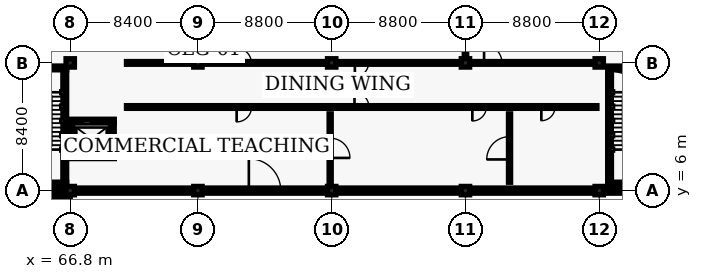
"""IFC4 building model, lengths in metres.
Left out: names, types, materials, properties, quantities, classifications, styles, units other than length and angle.
Written with IfcOpenShell. Run it as: python <this file> out.ifc"""

import sys

from ifc_helpers import new_model, si_unit, direction, frame, frame_2d, origin, origin_2d, place, context, subcontext, project, spatial, rectangle, extrude, element, fill, save


model = new_model("IFC4")
c1 = context("Model", 3, precision=1e-05, world=origin(), true_north=direction((0.0, 1.0)))
c2 = subcontext(c1, "Body", "Model", "MODEL_VIEW")
j1 = project(units=[si_unit("LENGTHUNIT", "METRE"), si_unit("PLANEANGLEUNIT", "RADIAN")], contexts=[c1])
p1 = place(None, origin())
s1 = spatial("IfcSite", under=j1, at=p1, CompositionType="ELEMENT")
p2 = place(p1, origin())
s2 = spatial("IfcBuilding", under=s1, at=p2, CompositionType="ELEMENT")
p3 = place(p2, origin())
s3 = spatial("IfcBuildingStorey", under=s2, at=p3, CompositionType="ELEMENT", Elevation=0.0)
for number, where, z_axis, x_axis in (
    (1, (66.8, 6.0, 0.0), (0.0, 0.0, 1.0), (1.0, 0.0, 0.0)),
    (2, (66.8, 14.4, 0.0), (0.0, 0.0, 1.0), (1.0, 0.0, 0.0)),
    (3, (75.2, 6.0, 0.0), (0.0, 0.0, 1.0), (1.0, 0.0, 0.0)),
    (4, (75.2, 14.4, 0.0), (0.0, 0.0, 1.0), (1.0, 0.0, 0.0)),
    (5, (84.0, 6.0, 0.0), (0.0, 0.0, 1.0), (1.0, 0.0, 0.0)),
    (6, (84.0, 14.4, 0.0), (0.0, 0.0, 1.0), (1.0, 0.0, 0.0)),
    (7, (92.8, 6.0, 0.0), (0.0, 0.0, 1.0), (1.0, 0.0, 0.0)),
    (8, (92.8, 14.4, 0.0), (0.0, 0.0, 1.0), (1.0, 0.0, 0.0)),
    (9, (101.6, 6.0, 0.0), (0.0, 0.0, 1.0), (1.0, 0.0, 0.0)),
    (10, (101.6, 14.4, 0.0), (0.0, 0.0, 1.0), (1.0, 0.0, 0.0)),
):
    element("IfcColumn", number, at=place(p3, frame(where, z_axis=z_axis, x_axis=x_axis)), inside=s3, PredefinedType="COLUMN", context=c2, shape_type="SweptSolid", body=[
        extrude(rectangle(XDim=0.55, YDim=0.55, at=origin_2d()), origin(), (0.0, 0.0, 1.0), 4.8),
    ])
p4 = place(p3, frame((58.5, 6.0, 0.0), z_axis=(0.0, 0.0, 1.0), x_axis=(1.0, 0.0, 0.0)))
e11 = element("IfcWall", 11, at=p4, inside=s3, PredefinedType="SOLIDWALL", context=c2, shape_type="SweptSolid", body=[
    extrude(rectangle(XDim=8.2, YDim=0.34, at=frame_2d((4.1, 0.0))), origin(), (0.0, 0.0, 1.0), 4.065),
])
p5 = place(p3, frame((66.9, 6.0, 0.0), z_axis=(0.0, 0.0, 1.0), x_axis=(1.0, 0.0, 0.0)))
e12 = element("IfcWall", 12, at=p5, inside=s3, PredefinedType="SOLIDWALL", context=c2, shape_type="SweptSolid", body=[
    extrude(rectangle(XDim=8.2, YDim=0.34, at=frame_2d((4.1, 0.0))), origin(), (0.0, 0.0, 1.0), 4.065),
])
p6 = place(p3, frame((75.3, 6.0, 0.0), z_axis=(0.0, 0.0, 1.0), x_axis=(1.0, 0.0, 0.0)))
e13 = element("IfcWall", 13, at=p6, inside=s3, PredefinedType="SOLIDWALL", context=c2, shape_type="SweptSolid", body=[
    extrude(rectangle(XDim=8.6, YDim=0.34, at=frame_2d((4.3, 0.0))), origin(), (0.0, 0.0, 1.0), 4.065),
])
p7 = place(p6, frame((3.25, 0.0, 0.0)))
e14 = element("IfcOpeningElement", 14, at=p7, cuts=e13, PredefinedType="OPENING", context=c2, shape_type="SweptSolid", body=[
    extrude(rectangle(XDim=2.1, YDim=2.35, at=frame_2d((1.05, 1.175))), frame((0.0, 0.18, 0.0), z_axis=(0.0, -1.0, 0.0), x_axis=(1.0, 0.0, 0.0)), (0.0, 0.0, 1.0), 0.36),
])
p8 = place(p3, frame((84.1, 6.0, 0.0), z_axis=(0.0, 0.0, 1.0), x_axis=(1.0, 0.0, 0.0)))
e15 = element("IfcWall", 15, at=p8, inside=s3, PredefinedType="SOLIDWALL", context=c2, shape_type="SweptSolid", body=[
    extrude(rectangle(XDim=8.6, YDim=0.34, at=frame_2d((4.3, 0.0))), origin(), (0.0, 0.0, 1.0), 4.065),
])
p9 = place(p8, frame((2.117, 0.0, 1.1)))
e16 = element("IfcOpeningElement", 16, at=p9, cuts=e15, PredefinedType="OPENING", context=c2, shape_type="SweptSolid", body=[
    extrude(rectangle(XDim=1.5, YDim=1.8, at=frame_2d((0.75, 0.9))), frame((0.0, 0.18, 0.0), z_axis=(0.0, -1.0, 0.0), x_axis=(1.0, 0.0, 0.0)), (0.0, 0.0, 1.0), 0.36),
])
p10 = place(p8, frame((4.983, 0.0, 1.1)))
e17 = element("IfcOpeningElement", 17, at=p10, cuts=e15, PredefinedType="OPENING", context=c2, shape_type="SweptSolid", body=[
    extrude(rectangle(XDim=1.5, YDim=1.8, at=frame_2d((0.75, 0.9))), frame((0.0, 0.18, 0.0), z_axis=(0.0, -1.0, 0.0), x_axis=(1.0, 0.0, 0.0)), (0.0, 0.0, 1.0), 0.36),
])
p11 = place(p3, frame((92.9, 6.0, 0.0), z_axis=(0.0, 0.0, 1.0), x_axis=(1.0, 0.0, 0.0)))
e18 = element("IfcWall", 18, at=p11, inside=s3, PredefinedType="SOLIDWALL", context=c2, shape_type="SweptSolid", body=[
    extrude(rectangle(XDim=8.6, YDim=0.34, at=frame_2d((4.3, 0.0))), origin(), (0.0, 0.0, 1.0), 4.065),
])
p12 = place(p11, frame((1.967, 0.0, 1.1)))
e19 = element("IfcOpeningElement", 19, at=p12, cuts=e18, PredefinedType="OPENING", context=c2, shape_type="SweptSolid", body=[
    extrude(rectangle(XDim=1.8, YDim=1.8, at=frame_2d((0.9, 0.9))), frame((0.0, 0.18, 0.0), z_axis=(0.0, -1.0, 0.0), x_axis=(1.0, 0.0, 0.0)), (0.0, 0.0, 1.0), 0.36),
])
p13 = place(p11, frame((4.833, 0.0, 1.1)))
e20 = element("IfcOpeningElement", 20, at=p13, cuts=e18, PredefinedType="OPENING", context=c2, shape_type="SweptSolid", body=[
    extrude(rectangle(XDim=1.8, YDim=1.8, at=frame_2d((0.9, 0.9))), frame((0.0, 0.18, 0.0), z_axis=(0.0, -1.0, 0.0), x_axis=(1.0, 0.0, 0.0)), (0.0, 0.0, 1.0), 0.36),
])
p14 = place(p3, frame((101.7, 6.0, 0.0), z_axis=(0.0, 0.0, 1.0), x_axis=(1.0, 0.0, 0.0)))
e21 = element("IfcWall", 21, at=p14, inside=s3, PredefinedType="SOLIDWALL", context=c2, shape_type="SweptSolid", body=[
    extrude(rectangle(XDim=8.6, YDim=0.34, at=frame_2d((4.3, 0.0))), origin(), (0.0, 0.0, 1.0), 4.065),
])
p15 = place(p3, frame((58.4, 5.45, 0.0), z_axis=(0.0, 0.0, 1.0), x_axis=(1.0, 0.0, 0.0)))
e22 = element("IfcWall", 22, at=p15, inside=s3, PredefinedType="PARAPET", context=c2, shape_type="SweptSolid", body=[
    extrude(rectangle(XDim=8.4, YDim=0.2, at=frame_2d((4.2, 0.0))), origin(), (0.0, 0.0, 1.0), 1.2),
])
p16 = place(p3, frame((62.955, 14.07, 0.0), z_axis=(0.0, 0.0, 1.0), x_axis=(1.0, 0.0, 0.0)))
e23 = element("IfcWall", 23, at=p16, inside=s3, PredefinedType="SHEAR", context=c2, shape_type="SweptSolid", body=[
    extrude(rectangle(XDim=3.61, YDim=0.25, at=frame_2d((1.805, 0.0))), origin(), (0.0, 0.0, 1.0), 4.56),
])
p17 = place(p16, frame((1.205, 0.0, 0.0)))
e24 = element("IfcOpeningElement", 24, at=p17, cuts=e23, PredefinedType="OPENING", context=c2, shape_type="SweptSolid", body=[
    extrude(rectangle(XDim=1.2, YDim=2.15, at=frame_2d((0.6, 1.075))), frame((0.0, 0.135, 0.0), z_axis=(0.0, -1.0, 0.0), x_axis=(1.0, 0.0, 0.0)), (0.0, 0.0, 1.0), 0.27),
])
p18 = place(p3, frame((66.565, 6.43, 0.0), z_axis=(0.0, 0.0, 1.0), x_axis=(-1.0, 0.0, 0.0)))
e25 = element("IfcWall", 25, at=p18, inside=s3, PredefinedType="SHEAR", context=c2, shape_type="SweptSolid", body=[
    extrude(rectangle(XDim=3.61, YDim=0.25, at=frame_2d((1.805, 0.0))), origin(), (0.0, 0.0, 1.0), 4.56),
])
p19 = place(p3, frame((66.44, 13.945, 0.0), z_axis=(0.0, 0.0, 1.0), x_axis=(0.0, -1.0, 0.0)))
e26 = element("IfcWall", 26, at=p19, inside=s3, PredefinedType="SHEAR", context=c2, shape_type="SweptSolid", body=[
    extrude(rectangle(XDim=7.39, YDim=0.25, at=frame_2d((3.695, 0.0))), origin(), (0.0, 0.0, 1.0), 4.56),
])
p20 = place(p3, frame((66.7, 8.23, 0.0), z_axis=(0.0, 0.0, 1.0), x_axis=(1.0, 0.0, 0.0)))
e27 = element("IfcWall", 27, at=p20, inside=s3, PredefinedType="SHEAR", context=c2, shape_type="SweptSolid", body=[
    extrude(rectangle(XDim=3.0, YDim=0.25, at=frame_2d((1.5, 0.0))), origin(), (0.0, 0.0, 1.0), 4.56),
])
p21 = place(p3, frame((69.7, 10.57, 0.0), z_axis=(0.0, 0.0, 1.0), x_axis=(-1.0, 0.0, 0.0)))
e28 = element("IfcWall", 28, at=p21, inside=s3, PredefinedType="SHEAR", context=c2, shape_type="SweptSolid", body=[
    extrude(rectangle(XDim=3.0, YDim=0.25, at=frame_2d((1.5, 0.0))), origin(), (0.0, 0.0, 1.0), 4.56),
])
p22 = place(p21, frame((0.95, 0.0, 0.0)))
e29 = element("IfcOpeningElement", 29, at=p22, cuts=e28, PredefinedType="OPENING", context=c2, shape_type="SweptSolid", body=[
    extrude(rectangle(XDim=1.1, YDim=2.15, at=frame_2d((0.55, 1.075))), frame((0.0, 0.135, 0.0), z_axis=(0.0, -1.0, 0.0), x_axis=(1.0, 0.0, 0.0)), (0.0, 0.0, 1.0), 0.27),
])
for number, where, z_axis, x_axis in (
    (30, (69.57, 8.36, 0.0), (0.0, 0.0, 1.0), (0.0, 1.0, 0.0)),
    (31, (66.83, 10.44, 0.0), (0.0, 0.0, 1.0), (0.0, -1.0, 0.0)),
):
    element("IfcWall", number, at=place(p3, frame(where, z_axis=z_axis, x_axis=x_axis)), inside=s3, PredefinedType="SHEAR", context=c2, shape_type="SweptSolid", body=[
        extrude(rectangle(XDim=2.08, YDim=0.25, at=frame_2d((1.04, 0.0))), origin(), (0.0, 0.0, 1.0), 4.56),
    ])
p23 = place(p3, frame((102.155, 14.07, 0.0), z_axis=(0.0, 0.0, 1.0), x_axis=(1.0, 0.0, 0.0)))
e32 = element("IfcWall", 32, at=p23, inside=s3, PredefinedType="SHEAR", context=c2, shape_type="SweptSolid", body=[
    extrude(rectangle(XDim=3.61, YDim=0.25, at=frame_2d((1.805, 0.0))), origin(), (0.0, 0.0, 1.0), 4.56),
])
p24 = place(p23, frame((1.235, 0.0, 0.0)))
e33 = element("IfcOpeningElement", 33, at=p24, cuts=e32, PredefinedType="OPENING", context=c2, shape_type="SweptSolid", body=[
    extrude(rectangle(XDim=1.14, YDim=2.15, at=frame_2d((0.57, 1.075))), frame((0.0, 0.135, 0.0), z_axis=(0.0, -1.0, 0.0), x_axis=(1.0, 0.0, 0.0)), (0.0, 0.0, 1.0), 0.27),
])
p25 = place(p3, frame((105.765, 6.43, 0.0), z_axis=(0.0, 0.0, 1.0), x_axis=(-1.0, 0.0, 0.0)))
e34 = element("IfcWall", 34, at=p25, inside=s3, PredefinedType="SHEAR", context=c2, shape_type="SweptSolid", body=[
    extrude(rectangle(XDim=3.61, YDim=0.25, at=frame_2d((1.805, 0.0))), origin(), (0.0, 0.0, 1.0), 4.56),
])
p26 = place(p3, frame((102.28, 6.555, 0.0), z_axis=(0.0, 0.0, 1.0), x_axis=(0.0, 1.0, 0.0)))
e35 = element("IfcWall", 35, at=p26, inside=s3, PredefinedType="SHEAR", context=c2, shape_type="SweptSolid", body=[
    extrude(rectangle(XDim=7.39, YDim=0.25, at=frame_2d((3.695, 0.0))), origin(), (0.0, 0.0, 1.0), 4.56),
])
p27 = place(p3, frame((70.5, 11.5, 0.0), z_axis=(0.0, 0.0, 1.0), x_axis=(1.0, 0.0, 0.0)))
e36 = element("IfcWall", 36, at=p27, inside=s3, PredefinedType="PARTITIONING", context=c2, shape_type="SweptSolid", body=[
    extrude(rectangle(XDim=30.95, YDim=0.18, at=frame_2d((15.475, 0.0))), origin(), (0.0, 0.0, 1.0), 3.845),
])
p28 = place(p27, frame((7.247, 0.0, 0.0)))
e37 = element("IfcOpeningElement", 37, at=p28, cuts=e36, PredefinedType="OPENING", context=c2, shape_type="SweptSolid", body=[
    extrude(rectangle(XDim=0.98, YDim=2.12, at=frame_2d((0.49, 1.06))), frame((0.0, 0.1, 0.0), z_axis=(0.0, -1.0, 0.0), x_axis=(1.0, 0.0, 0.0)), (0.0, 0.0, 1.0), 0.2),
])
p29 = place(p27, frame((15.0, 0.0, 0.0)))
e38 = element("IfcOpeningElement", 38, at=p29, cuts=e36, PredefinedType="OPENING", context=c2, shape_type="SweptSolid", body=[
    extrude(rectangle(XDim=0.95, YDim=2.12, at=frame_2d((0.475, 1.06))), frame((0.0, 0.1, 0.0), z_axis=(0.0, -1.0, 0.0), x_axis=(1.0, 0.0, 0.0)), (0.0, 0.0, 1.0), 0.2),
])
p30 = place(p27, frame((22.753, 0.0, 0.0)))
e39 = element("IfcOpeningElement", 39, at=p30, cuts=e36, PredefinedType="OPENING", context=c2, shape_type="SweptSolid", body=[
    extrude(rectangle(XDim=0.92, YDim=2.1, at=frame_2d((0.46, 1.05))), frame((0.0, 0.1, 0.0), z_axis=(0.0, -1.0, 0.0), x_axis=(1.0, 0.0, 0.0)), (0.0, 0.0, 1.0), 0.2),
])
p31 = place(p27, frame((27.292, 0.0, 0.0)))
e40 = element("IfcOpeningElement", 40, at=p31, cuts=e36, PredefinedType="OPENING", context=c2, shape_type="SweptSolid", body=[
    extrude(rectangle(XDim=0.9, YDim=2.06, at=frame_2d((0.45, 1.03))), frame((0.0, 0.1, 0.0), z_axis=(0.0, -1.0, 0.0), x_axis=(1.0, 0.0, 0.0)), (0.0, 0.0, 1.0), 0.2),
])
p32 = place(p3, frame((70.5, 14.4, 0.0), z_axis=(0.0, 0.0, 1.0), x_axis=(1.0, 0.0, 0.0)))
e41 = element("IfcWall", 41, at=p32, inside=s3, PredefinedType="PARTITIONING", context=c2, shape_type="SweptSolid", body=[
    extrude(rectangle(XDim=30.95, YDim=0.18, at=frame_2d((15.475, 0.0))), origin(), (0.0, 0.0, 1.0), 3.795),
])
p33 = place(p32, frame((7.257, 0.0, 0.0)))
e42 = element("IfcOpeningElement", 42, at=p33, cuts=e41, PredefinedType="OPENING", context=c2, shape_type="SweptSolid", body=[
    extrude(rectangle(XDim=0.96, YDim=2.08, at=frame_2d((0.48, 1.04))), frame((0.0, 0.1, 0.0), z_axis=(0.0, -1.0, 0.0), x_axis=(1.0, 0.0, 0.0)), (0.0, 0.0, 1.0), 0.2),
])
p34 = place(p32, frame((15.025, 0.0, 0.0)))
e43 = element("IfcOpeningElement", 43, at=p34, cuts=e41, PredefinedType="OPENING", context=c2, shape_type="SweptSolid", body=[
    extrude(rectangle(XDim=0.9, YDim=2.06, at=frame_2d((0.45, 1.03))), frame((0.0, 0.1, 0.0), z_axis=(0.0, -1.0, 0.0), x_axis=(1.0, 0.0, 0.0)), (0.0, 0.0, 1.0), 0.2),
])
p35 = place(p32, frame((23.523, 0.0, 0.0)))
e44 = element("IfcOpeningElement", 44, at=p35, cuts=e41, PredefinedType="OPENING", context=c2, shape_type="SweptSolid", body=[
    extrude(rectangle(XDim=1.18, YDim=2.18, at=frame_2d((0.59, 1.09))), frame((0.0, 0.1, 0.0), z_axis=(0.0, -1.0, 0.0), x_axis=(1.0, 0.0, 0.0)), (0.0, 0.0, 1.0), 0.2),
])
p36 = place(p3, frame((83.9, 6.55, 0.0), z_axis=(0.0, 0.0, 1.0), x_axis=(0.0, 1.0, 0.0)))
e45 = element("IfcWall", 45, at=p36, inside=s3, PredefinedType="PARTITIONING", context=c2, shape_type="SweptSolid", body=[
    extrude(rectangle(XDim=4.5, YDim=0.14, at=frame_2d((2.25, 0.0))), origin(), (0.0, 0.0, 1.0), 3.845),
])
p37 = place(p36, frame((1.6, 0.0, 0.0)))
e46 = element("IfcOpeningElement", 46, at=p37, cuts=e45, PredefinedType="OPENING", context=c2, shape_type="SweptSolid", body=[
    extrude(rectangle(XDim=1.3, YDim=2.2, at=frame_2d((0.65, 1.1))), frame((0.0, 0.08, 0.0), z_axis=(0.0, -1.0, 0.0), x_axis=(1.0, 0.0, 0.0)), (0.0, 0.0, 1.0), 0.16),
])
p38 = place(p3, frame((95.7, 6.55, 0.0), z_axis=(0.0, 0.0, 1.0), x_axis=(0.0, 1.0, 0.0)))
e47 = element("IfcWall", 47, at=p38, inside=s3, PredefinedType="PARTITIONING", context=c2, shape_type="SweptSolid", body=[
    extrude(rectangle(XDim=4.5, YDim=0.14, at=frame_2d((2.25, 0.0))), origin(), (0.0, 0.0, 1.0), 4.025),
])
p39 = place(p38, frame((1.5, 0.0, 0.0)))
e48 = element("IfcOpeningElement", 48, at=p39, cuts=e47, PredefinedType="OPENING", context=c2, shape_type="SweptSolid", body=[
    extrude(rectangle(XDim=1.5, YDim=2.25, at=frame_2d((0.75, 1.125))), frame((0.0, 0.08, 0.0), z_axis=(0.0, -1.0, 0.0), x_axis=(1.0, 0.0, 0.0)), (0.0, 0.0, 1.0), 0.16),
])
p40 = place(p3, frame((92.8, 14.85, 0.0), z_axis=(0.0, 0.0, 1.0), x_axis=(0.0, 1.0, 0.0)))
e49 = element("IfcWall", 49, at=p40, inside=s3, PredefinedType="PARTITIONING", context=c2, shape_type="SweptSolid", body=[
    extrude(rectangle(XDim=7.2, YDim=0.16, at=frame_2d((3.6, 0.0))), origin(), (0.0, 0.0, 1.0), 3.845),
])
p41 = place(p40, frame((2.98, 0.0, 0.0)))
e50 = element("IfcOpeningElement", 50, at=p41, cuts=e49, PredefinedType="OPENING", context=c2, shape_type="SweptSolid", body=[
    extrude(rectangle(XDim=1.24, YDim=2.2, at=frame_2d((0.62, 1.1))), frame((0.0, 0.09, 0.0), z_axis=(0.0, -1.0, 0.0), x_axis=(1.0, 0.0, 0.0)), (0.0, 0.0, 1.0), 0.18),
])
p42 = place(p9, origin())
e51 = element("IfcWindow", 51, at=p42, inside=s3, PartitioningType="SINGLE_PANEL", PredefinedType="WINDOW", context=c2, shape_type="SweptSolid", body=[
    extrude(rectangle(XDim=1.5, YDim=1.8, at=frame_2d((0.75, 0.9))), frame((0.0, 0.03, 0.0), z_axis=(0.0, -1.0, 0.0), x_axis=(1.0, 0.0, 0.0)), (0.0, 0.0, 1.0), 0.06),
])
fill(e16, e51)
p43 = place(p10, origin())
e52 = element("IfcWindow", 52, at=p43, inside=s3, PartitioningType="SINGLE_PANEL", PredefinedType="WINDOW", context=c2, shape_type="SweptSolid", body=[
    extrude(rectangle(XDim=1.5, YDim=1.8, at=frame_2d((0.75, 0.9))), frame((0.0, 0.03, 0.0), z_axis=(0.0, -1.0, 0.0), x_axis=(1.0, 0.0, 0.0)), (0.0, 0.0, 1.0), 0.06),
])
fill(e17, e52)
p44 = place(p12, origin())
e53 = element("IfcWindow", 53, at=p44, inside=s3, PartitioningType="SINGLE_PANEL", PredefinedType="WINDOW", context=c2, shape_type="SweptSolid", body=[
    extrude(rectangle(XDim=1.8, YDim=1.8, at=frame_2d((0.9, 0.9))), frame((0.0, 0.03, 0.0), z_axis=(0.0, -1.0, 0.0), x_axis=(1.0, 0.0, 0.0)), (0.0, 0.0, 1.0), 0.06),
])
fill(e19, e53)
p45 = place(p13, origin())
e54 = element("IfcWindow", 54, at=p45, inside=s3, PartitioningType="SINGLE_PANEL", PredefinedType="WINDOW", context=c2, shape_type="SweptSolid", body=[
    extrude(rectangle(XDim=1.8, YDim=1.8, at=frame_2d((0.9, 0.9))), frame((0.0, 0.03, 0.0), z_axis=(0.0, -1.0, 0.0), x_axis=(1.0, 0.0, 0.0)), (0.0, 0.0, 1.0), 0.06),
])
fill(e20, e54)
p46 = place(p22, origin())
e55 = element("IfcDoor", 55, at=p46, inside=s3, OperationType="SLIDING_TO_LEFT", PredefinedType="DOOR", context=c2, shape_type="SweptSolid", body=[
    extrude(rectangle(XDim=1.1, YDim=2.15, at=frame_2d((0.55, 1.075))), frame((0.0, 0.025, 0.0), z_axis=(0.0, -1.0, 0.0), x_axis=(1.0, 0.0, 0.0)), (0.0, 0.0, 1.0), 0.05),
])
fill(e29, e55)
p47 = place(p7, origin())
e56 = element("IfcDoor", 56, at=p47, inside=s3, OperationType="DOUBLE_DOOR_SINGLE_SWING", PredefinedType="DOOR", context=c2, shape_type="SweptSolid", body=[
    extrude(rectangle(XDim=2.1, YDim=2.35, at=frame_2d((1.05, 1.175))), frame((0.0, 0.025, 0.0), z_axis=(0.0, -1.0, 0.0), x_axis=(1.0, 0.0, 0.0)), (0.0, 0.0, 1.0), 0.05),
])
fill(e14, e56)
p48 = place(p28, origin())
e57 = element("IfcDoor", 57, at=p48, inside=s3, OperationType="SINGLE_SWING_RIGHT", PredefinedType="DOOR", context=c2, shape_type="SweptSolid", body=[
    extrude(rectangle(XDim=0.98, YDim=2.12, at=frame_2d((0.49, 1.06))), frame((0.0, 0.025, 0.0), z_axis=(0.0, -1.0, 0.0), x_axis=(1.0, 0.0, 0.0)), (0.0, 0.0, 1.0), 0.05),
])
fill(e37, e57)
p49 = place(p29, origin())
e58 = element("IfcDoor", 58, at=p49, inside=s3, OperationType="SINGLE_SWING_LEFT", PredefinedType="DOOR", context=c2, shape_type="SweptSolid", body=[
    extrude(rectangle(XDim=0.95, YDim=2.12, at=frame_2d((0.475, 1.06))), frame((0.0, 0.025, 0.0), z_axis=(0.0, -1.0, 0.0), x_axis=(1.0, 0.0, 0.0)), (0.0, 0.0, 1.0), 0.05),
])
fill(e38, e58)
p50 = place(p30, origin())
e59 = element("IfcDoor", 59, at=p50, inside=s3, OperationType="SINGLE_SWING_RIGHT", PredefinedType="DOOR", context=c2, shape_type="SweptSolid", body=[
    extrude(rectangle(XDim=0.92, YDim=2.1, at=frame_2d((0.46, 1.05))), frame((0.0, 0.025, 0.0), z_axis=(0.0, -1.0, 0.0), x_axis=(1.0, 0.0, 0.0)), (0.0, 0.0, 1.0), 0.05),
])
fill(e39, e59)
p51 = place(p33, origin())
e60 = element("IfcDoor", 60, at=p51, inside=s3, OperationType="SINGLE_SWING_LEFT", PredefinedType="DOOR", context=c2, shape_type="SweptSolid", body=[
    extrude(rectangle(XDim=0.96, YDim=2.08, at=frame_2d((0.48, 1.04))), frame((0.0, 0.025, 0.0), z_axis=(0.0, -1.0, 0.0), x_axis=(1.0, 0.0, 0.0)), (0.0, 0.0, 1.0), 0.05),
])
fill(e42, e60)
p52 = place(p34, origin())
e61 = element("IfcDoor", 61, at=p52, inside=s3, OperationType="SINGLE_SWING_RIGHT", PredefinedType="DOOR", context=c2, shape_type="SweptSolid", body=[
    extrude(rectangle(XDim=0.9, YDim=2.06, at=frame_2d((0.45, 1.03))), frame((0.0, 0.025, 0.0), z_axis=(0.0, -1.0, 0.0), x_axis=(1.0, 0.0, 0.0)), (0.0, 0.0, 1.0), 0.05),
])
fill(e43, e61)
p53 = place(p35, origin())
e62 = element("IfcDoor", 62, at=p53, inside=s3, OperationType="SINGLE_SWING_LEFT", PredefinedType="DOOR", context=c2, shape_type="SweptSolid", body=[
    extrude(rectangle(XDim=1.18, YDim=2.18, at=frame_2d((0.59, 1.09))), frame((0.0, 0.025, 0.0), z_axis=(0.0, -1.0, 0.0), x_axis=(1.0, 0.0, 0.0)), (0.0, 0.0, 1.0), 0.05),
])
fill(e44, e62)
p54 = place(p37, origin())
e63 = element("IfcDoor", 63, at=p54, inside=s3, OperationType="SINGLE_SWING_RIGHT", PredefinedType="DOOR", context=c2, shape_type="SweptSolid", body=[
    extrude(rectangle(XDim=1.3, YDim=2.2, at=frame_2d((0.65, 1.1))), frame((0.0, 0.025, 0.0), z_axis=(0.0, -1.0, 0.0), x_axis=(1.0, 0.0, 0.0)), (0.0, 0.0, 1.0), 0.05),
])
fill(e46, e63)
p55 = place(p39, origin())
e64 = element("IfcDoor", 64, at=p55, inside=s3, OperationType="DOUBLE_DOOR_SINGLE_SWING", PredefinedType="DOOR", context=c2, shape_type="SweptSolid", body=[
    extrude(rectangle(XDim=1.5, YDim=2.25, at=frame_2d((0.75, 1.125))), frame((0.0, 0.025, 0.0), z_axis=(0.0, -1.0, 0.0), x_axis=(1.0, 0.0, 0.0)), (0.0, 0.0, 1.0), 0.05),
])
fill(e48, e64)
p56 = place(p31, origin())
e65 = element("IfcDoor", 65, at=p56, inside=s3, OperationType="SINGLE_SWING_RIGHT", PredefinedType="DOOR", context=c2, shape_type="SweptSolid", body=[
    extrude(rectangle(XDim=0.9, YDim=2.06, at=frame_2d((0.45, 1.03))), frame((0.0, 0.025, 0.0), z_axis=(0.0, -1.0, 0.0), x_axis=(1.0, 0.0, 0.0)), (0.0, 0.0, 1.0), 0.05),
])
fill(e40, e65)
save(model, sys.argv[1])
